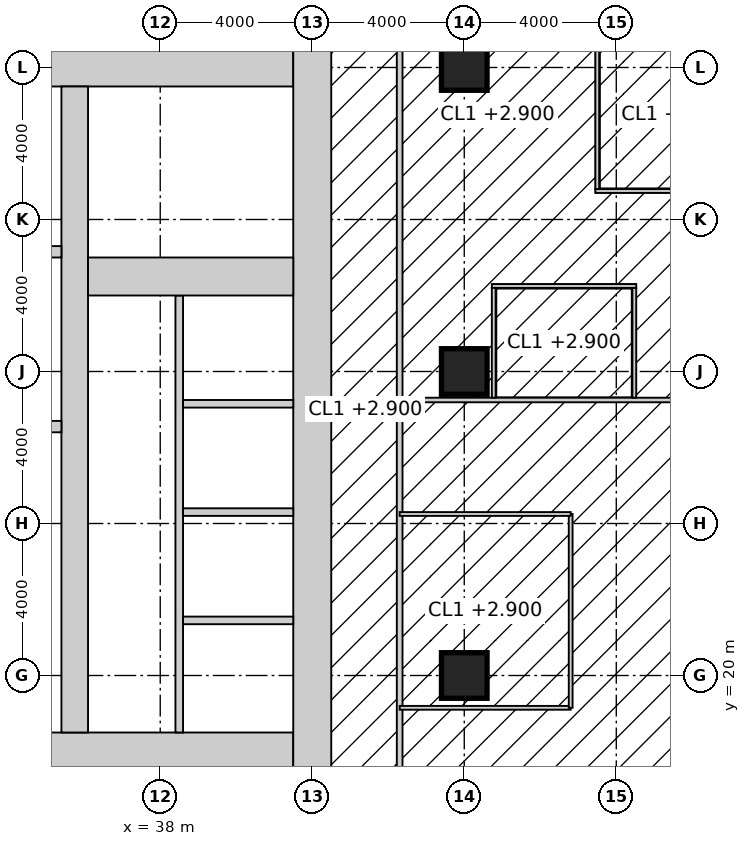
"""IFC4 building model, lengths in metres.
Left out: names, types, materials, properties, quantities, classifications, styles, units other than length and angle.
Written with IfcOpenShell. Run it as: python <this file> out.ifc"""

import sys

from ifc_helpers import new_model, si_unit, direction, frame, frame_2d, origin, origin_2d, place, context, subcontext, project, spatial, rectangle, hollow_rectangle, extrude, element, fill, save


model = new_model("IFC4")
c1 = context("Model", 3, precision=1e-05, world=origin(), true_north=direction((0.0, 1.0)))
c2 = subcontext(c1, "Body", "Model", "MODEL_VIEW")
j1 = project(units=[si_unit("LENGTHUNIT", "METRE"), si_unit("PLANEANGLEUNIT", "RADIAN")], contexts=[c1])
p1 = place(None, origin())
s1 = spatial("IfcSite", under=j1, at=p1, CompositionType="ELEMENT")
p2 = place(p1, origin())
s2 = spatial("IfcBuilding", under=s1, at=p2, CompositionType="ELEMENT")
p3 = place(p2, frame((0.0, 0.0, 19.0)))
s3 = spatial("IfcBuildingStorey", under=s2, at=p3, CompositionType="ELEMENT", Elevation=19.0)
for number, where, z_axis, x_axis in (
    (1, (46.0, 20.0, 0.0), (0.0, 0.0, 1.0), (1.0, 0.0, 0.0)),
    (2, (46.0, 28.0, 0.0), (0.0, 0.0, 1.0), (1.0, 0.0, 0.0)),
    (3, (46.0, 36.0, 0.0), (0.0, 0.0, 1.0), (1.0, 0.0, 0.0)),
):
    element("IfcColumn", number, at=place(p3, frame(where, z_axis=z_axis, x_axis=x_axis)), inside=s3, PredefinedType="COLUMN", context=c2, shape_type="SweptSolid", body=[
        extrude(hollow_rectangle(XDim=1.2, YDim=1.2, WallThickness=0.1, at=origin_2d()), origin(), (0.0, 0.0, 1.0), 4.0),
    ])
p4 = place(p3, frame((18.5, 17.8, -0.15), z_axis=(0.0, 0.0, 1.0), x_axis=(1.0, 0.0, 0.0)))
e4 = element("IfcWall", 4, at=p4, inside=s3, PredefinedType="SHEAR", context=c2, shape_type="SweptSolid", body=[
    extrude(rectangle(XDim=23.0, YDim=1.4, at=frame_2d((11.5, 0.0))), origin(), (0.0, 0.0, 1.0), 4.0),
])
p5 = place(p4, frame((3.45, 0.0, 0.15)))
e5 = element("IfcOpeningElement", 5, at=p5, cuts=e4, PredefinedType="OPENING", context=c2, shape_type="SweptSolid", body=[
    extrude(rectangle(XDim=1.5, YDim=2.4, at=frame_2d((0.75, 1.2))), frame((0.0, 0.71, 0.0), z_axis=(0.0, -1.0, 0.0), x_axis=(1.0, 0.0, 0.0)), (0.0, 0.0, 1.0), 1.42),
])
p6 = place(p4, frame((17.9, 0.0, 0.15)))
e6 = element("IfcOpeningElement", 6, at=p6, cuts=e4, PredefinedType="OPENING", context=c2, shape_type="SweptSolid", body=[
    extrude(rectangle(XDim=1.5, YDim=2.4, at=frame_2d((0.75, 1.2))), frame((0.0, 0.71, 0.0), z_axis=(0.0, -1.0, 0.0), x_axis=(1.0, 0.0, 0.0)), (0.0, 0.0, 1.0), 1.42),
])
p7 = place(p4, frame((0.9, 0.0, 0.15)))
e7 = element("IfcOpeningElement", 7, at=p7, cuts=e4, PredefinedType="OPENING", context=c2, shape_type="SweptSolid", body=[
    extrude(rectangle(XDim=1.0, YDim=2.2, at=frame_2d((0.5, 1.1))), frame((0.0, 0.71, 0.0), z_axis=(0.0, -1.0, 0.0), x_axis=(1.0, 0.0, 0.0)), (0.0, 0.0, 1.0), 1.42),
])
p8 = place(p3, frame((18.5, 36.2, -0.15), z_axis=(0.0, 0.0, 1.0), x_axis=(1.0, 0.0, 0.0)))
e8 = element("IfcWall", 8, at=p8, inside=s3, PredefinedType="SHEAR", context=c2, shape_type="SweptSolid", body=[
    extrude(rectangle(XDim=23.0, YDim=1.4, at=frame_2d((11.5, 0.0))), origin(), (0.0, 0.0, 1.0), 4.0),
])
p9 = place(p3, frame((42.0, 17.1, -0.15), z_axis=(0.0, 0.0, 1.0), x_axis=(0.0, 1.0, 0.0)))
e9 = element("IfcWall", 9, at=p9, inside=s3, PredefinedType="SHEAR", context=c2, shape_type="SweptSolid", body=[
    extrude(rectangle(XDim=19.8, YDim=1.0, at=frame_2d((9.9, 0.0))), origin(), (0.0, 0.0, 1.0), 4.0),
])
p10 = place(p3, frame((35.75, 18.5, -0.15), z_axis=(0.0, 0.0, 1.0), x_axis=(0.0, 1.0, 0.0)))
e10 = element("IfcWall", 10, at=p10, inside=s3, PredefinedType="SHEAR", context=c2, shape_type="SweptSolid", body=[
    extrude(rectangle(XDim=17.0, YDim=0.7, at=frame_2d((8.5, 0.0))), origin(), (0.0, 0.0, 1.0), 4.0),
])
p11 = place(p10, frame((9.85, 0.0, 0.15)))
e11 = element("IfcOpeningElement", 11, at=p11, cuts=e10, PredefinedType="OPENING", context=c2, shape_type="SweptSolid", body=[
    extrude(rectangle(XDim=1.0, YDim=2.2, at=frame_2d((0.5, 1.1))), frame((0.0, 0.36, 0.0), z_axis=(0.0, -1.0, 0.0), x_axis=(1.0, 0.0, 0.0)), (0.0, 0.0, 1.0), 0.72),
])
p12 = place(p3, frame((24.15, 26.55, -0.15), z_axis=(0.0, 0.0, 1.0), x_axis=(1.0, 0.0, 0.0)))
e12 = element("IfcWall", 12, at=p12, inside=s3, PredefinedType="SHEAR", context=c2, shape_type="SweptSolid", body=[
    extrude(rectangle(XDim=11.25, YDim=0.3, at=frame_2d((5.625, 0.0))), origin(), (0.0, 0.0, 1.0), 4.0),
])
p13 = place(p12, frame((9.25, 0.0, 0.15)))
e13 = element("IfcOpeningElement", 13, at=p13, cuts=e12, PredefinedType="OPENING", context=c2, shape_type="SweptSolid", body=[
    extrude(rectangle(XDim=1.0, YDim=2.2, at=frame_2d((0.5, 1.1))), frame((0.0, 0.16, 0.0), z_axis=(0.0, -1.0, 0.0), x_axis=(1.0, 0.0, 0.0)), (0.0, 0.0, 1.0), 0.32),
])
p14 = place(p12, frame((4.9, 0.0, 0.15)))
e14 = element("IfcOpeningElement", 14, at=p14, cuts=e12, PredefinedType="OPENING", context=c2, shape_type="SweptSolid", body=[
    extrude(rectangle(XDim=1.5, YDim=2.4, at=frame_2d((0.75, 1.2))), frame((0.0, 0.16, 0.0), z_axis=(0.0, -1.0, 0.0), x_axis=(1.0, 0.0, 0.0)), (0.0, 0.0, 1.0), 0.32),
])
p15 = place(p3, frame((24.15, 31.15, -0.15), z_axis=(0.0, 0.0, 1.0), x_axis=(1.0, 0.0, 0.0)))
e15 = element("IfcWall", 15, at=p15, inside=s3, PredefinedType="SHEAR", context=c2, shape_type="SweptSolid", body=[
    extrude(rectangle(XDim=11.25, YDim=0.3, at=frame_2d((5.625, 0.0))), origin(), (0.0, 0.0, 1.0), 4.0),
])
p16 = place(p15, frame((7.25, 0.0, 0.15)))
e16 = element("IfcOpeningElement", 16, at=p16, cuts=e15, PredefinedType="OPENING", context=c2, shape_type="SweptSolid", body=[
    extrude(rectangle(XDim=1.4, YDim=2.4, at=frame_2d((0.7, 1.2))), frame((0.0, 0.16, 0.0), z_axis=(0.0, -1.0, 0.0), x_axis=(1.0, 0.0, 0.0)), (0.0, 0.0, 1.0), 0.32),
])
p17 = place(p3, frame((38.5, 18.5, -0.15), z_axis=(0.0, 0.0, 1.0), x_axis=(0.0, 1.0, 0.0)))
e17 = element("IfcWall", 17, at=p17, inside=s3, PredefinedType="SOLIDWALL", context=c2, shape_type="SweptSolid", body=[
    extrude(rectangle(XDim=11.5, YDim=0.2, at=frame_2d((5.75, 0.0))), origin(), (0.0, 0.0, 1.0), 4.0),
])
p18 = place(p17, frame((0.875, 0.0, 0.15)))
e18 = element("IfcOpeningElement", 18, at=p18, cuts=e17, PredefinedType="OPENING", context=c2, shape_type="SweptSolid", body=[
    extrude(rectangle(XDim=1.1, YDim=2.2, at=frame_2d((0.55, 1.1))), frame((0.0, 0.11, 0.0), z_axis=(0.0, -1.0, 0.0), x_axis=(1.0, 0.0, 0.0)), (0.0, 0.0, 1.0), 0.22),
])
p19 = place(p17, frame((3.825, 0.0, 0.15)))
e19 = element("IfcOpeningElement", 19, at=p19, cuts=e17, PredefinedType="OPENING", context=c2, shape_type="SweptSolid", body=[
    extrude(rectangle(XDim=1.1, YDim=2.2, at=frame_2d((0.55, 1.1))), frame((0.0, 0.11, 0.0), z_axis=(0.0, -1.0, 0.0), x_axis=(1.0, 0.0, 0.0)), (0.0, 0.0, 1.0), 0.22),
])
p20 = place(p17, frame((6.675, 0.0, 0.15)))
e20 = element("IfcOpeningElement", 20, at=p20, cuts=e17, PredefinedType="OPENING", context=c2, shape_type="SweptSolid", body=[
    extrude(rectangle(XDim=1.1, YDim=2.2, at=frame_2d((0.55, 1.1))), frame((0.0, 0.11, 0.0), z_axis=(0.0, -1.0, 0.0), x_axis=(1.0, 0.0, 0.0)), (0.0, 0.0, 1.0), 0.22),
])
p21 = place(p17, frame((9.575, 0.0, 0.15)))
e21 = element("IfcOpeningElement", 21, at=p21, cuts=e17, PredefinedType="OPENING", context=c2, shape_type="SweptSolid", body=[
    extrude(rectangle(XDim=1.1, YDim=2.2, at=frame_2d((0.55, 1.1))), frame((0.0, 0.11, 0.0), z_axis=(0.0, -1.0, 0.0), x_axis=(1.0, 0.0, 0.0)), (0.0, 0.0, 1.0), 0.22),
])
p22 = place(p3, frame((36.1, 30.5, -0.15), z_axis=(0.0, 0.0, 1.0), x_axis=(1.0, 0.0, 0.0)))
e22 = element("IfcWall", 22, at=p22, inside=s3, PredefinedType="SHEAR", context=c2, shape_type="SweptSolid", body=[
    extrude(rectangle(XDim=5.4, YDim=1.0, at=frame_2d((2.7, 0.0))), origin(), (0.0, 0.0, 1.0), 4.0),
])
p23 = place(p22, frame((0.6, 0.0, 0.15)))
e23 = element("IfcOpeningElement", 23, at=p23, cuts=e22, PredefinedType="OPENING", context=c2, shape_type="SweptSolid", body=[
    extrude(rectangle(XDim=1.0, YDim=2.2, at=frame_2d((0.5, 1.1))), frame((0.0, 0.51, 0.0), z_axis=(0.0, -1.0, 0.0), x_axis=(1.0, 0.0, 0.0)), (0.0, 0.0, 1.0), 1.02),
])
for number, where, z_axis, x_axis in (
    (24, (38.6, 21.45, -0.15), (0.0, 0.0, 1.0), (1.0, 0.0, 0.0)),
    (25, (38.6, 24.3, -0.15), (0.0, 0.0, 1.0), (1.0, 0.0, 0.0)),
    (26, (38.6, 27.15, -0.15), (0.0, 0.0, 1.0), (1.0, 0.0, 0.0)),
):
    element("IfcWall", number, at=place(p3, frame(where, z_axis=z_axis, x_axis=x_axis)), inside=s3, PredefinedType="SOLIDWALL", context=c2, shape_type="SweptSolid", body=[
        extrude(rectangle(XDim=2.9, YDim=0.2, at=frame_2d((1.45, 0.0))), origin(), (0.0, 0.0, 1.0), 4.0),
    ])
p24 = place(p3, frame((44.3, 15.225, 0.0), z_axis=(0.0, 0.0, 1.0), x_axis=(0.0, 1.0, 0.0)))
e27 = element("IfcWall", 27, at=p24, inside=s3, PredefinedType="PARTITIONING", context=c2, shape_type="SweptSolid", body=[
    extrude(rectangle(XDim=23.55, YDim=0.15, at=frame_2d((11.775, 0.0))), origin(), (0.0, 0.0, 1.0), 3.85),
])
p25 = place(p24, frame((5.575, 0.0, 0.0)))
e28 = element("IfcOpeningElement", 28, at=p25, cuts=e27, PredefinedType="OPENING", context=c2, shape_type="SweptSolid", body=[
    extrude(rectangle(XDim=1.8, YDim=2.4, at=frame_2d((0.9, 1.2))), frame((0.0, 0.085, 0.0), z_axis=(0.0, -1.0, 0.0), x_axis=(1.0, 0.0, 0.0)), (0.0, 0.0, 1.0), 0.17),
])
p26 = place(p24, frame((16.825, 0.0, 0.0)))
e29 = element("IfcOpeningElement", 29, at=p26, cuts=e27, PredefinedType="OPENING", context=c2, shape_type="SweptSolid", body=[
    extrude(rectangle(XDim=1.8, YDim=2.4, at=frame_2d((0.9, 1.2))), frame((0.0, 0.085, 0.0), z_axis=(0.0, -1.0, 0.0), x_axis=(1.0, 0.0, 0.0)), (0.0, 0.0, 1.0), 0.17),
])
p27 = place(p3, frame((44.375, 27.25, 0.0), z_axis=(0.0, 0.0, 1.0), x_axis=(1.0, 0.0, 0.0)))
e30 = element("IfcWall", 30, at=p27, inside=s3, PredefinedType="PARTITIONING", context=c2, shape_type="SweptSolid", body=[
    extrude(rectangle(XDim=9.325, YDim=0.12, at=frame_2d((4.663, 0.0))), origin(), (0.0, 0.0, 1.0), 3.85),
])
p28 = place(p3, frame((46.725, 30.25, 0.0), z_axis=(0.0, 0.0, 1.0), x_axis=(1.0, 0.0, 0.0)))
e31 = element("IfcWall", 31, at=p28, inside=s3, PredefinedType="PARTITIONING", context=c2, shape_type="SweptSolid", body=[
    extrude(rectangle(XDim=3.8, YDim=0.1, at=frame_2d((1.9, 0.0))), origin(), (0.0, 0.0, 1.0), 3.85),
])
p29 = place(p28, frame((1.4, 0.0, 0.0)))
e32 = element("IfcOpeningElement", 32, at=p29, cuts=e31, PredefinedType="OPENING", context=c2, shape_type="SweptSolid", body=[
    extrude(rectangle(XDim=1.0, YDim=2.2, at=frame_2d((0.5, 1.1))), frame((0.0, 0.06, 0.0), z_axis=(0.0, -1.0, 0.0), x_axis=(1.0, 0.0, 0.0)), (0.0, 0.0, 1.0), 0.12),
])
p30 = place(p3, frame((49.45, 32.75, 0.0), z_axis=(0.0, 0.0, 1.0), x_axis=(1.0, 0.0, 0.0)))
e33 = element("IfcWall", 33, at=p30, inside=s3, PredefinedType="PARTITIONING", context=c2, shape_type="SweptSolid", body=[
    extrude(rectangle(XDim=4.25, YDim=0.1, at=frame_2d((2.125, 0.0))), origin(), (0.0, 0.0, 1.0), 3.85),
])
p31 = place(p3, frame((46.775, 27.31, 0.0), z_axis=(0.0, 0.0, 1.0), x_axis=(0.0, 1.0, 0.0)))
e34 = element("IfcWall", 34, at=p31, inside=s3, PredefinedType="PARTITIONING", context=c2, shape_type="SweptSolid", body=[
    extrude(rectangle(XDim=2.89, YDim=0.1, at=frame_2d((1.445, 0.0))), origin(), (0.0, 0.0, 1.0), 3.85),
])
p32 = place(p3, frame((49.5, 32.8, 0.0), z_axis=(0.0, 0.0, 1.0), x_axis=(0.0, 1.0, 0.0)))
e35 = element("IfcWall", 35, at=p32, inside=s3, PredefinedType="PARTITIONING", context=c2, shape_type="SweptSolid", body=[
    extrude(rectangle(XDim=3.9, YDim=0.1, at=frame_2d((1.95, 0.0))), origin(), (0.0, 0.0, 1.0), 3.85),
])
p33 = place(p32, frame((1.45, 0.0, 0.0)))
e36 = element("IfcOpeningElement", 36, at=p33, cuts=e35, PredefinedType="OPENING", context=c2, shape_type="SweptSolid", body=[
    extrude(rectangle(XDim=1.0, YDim=2.2, at=frame_2d((0.5, 1.1))), frame((0.0, 0.06, 0.0), z_axis=(0.0, -1.0, 0.0), x_axis=(1.0, 0.0, 0.0)), (0.0, 0.0, 1.0), 0.12),
])
p34 = place(p3, frame((50.475, 27.31, 0.0), z_axis=(0.0, 0.0, 1.0), x_axis=(0.0, 1.0, 0.0)))
e37 = element("IfcWall", 37, at=p34, inside=s3, PredefinedType="PARTITIONING", context=c2, shape_type="SweptSolid", body=[
    extrude(rectangle(XDim=2.89, YDim=0.1, at=frame_2d((1.445, 0.0))), origin(), (0.0, 0.0, 1.0), 3.85),
])
p35 = place(p3, frame((44.3, 19.15, 0.0), z_axis=(0.0, 0.0, 1.0), x_axis=(1.0, 0.0, 0.0)))
e38 = element("IfcWall", 38, at=p35, inside=s3, PredefinedType="PARTITIONING", context=c2, shape_type="SweptSolid", body=[
    extrude(rectangle(XDim=4.5, YDim=0.1, at=frame_2d((2.25, 0.0))), origin(), (0.0, 0.0, 1.0), 3.85),
])
p36 = place(p3, frame((48.8, 19.15, 0.0), z_axis=(0.0, 0.0, 1.0), x_axis=(0.0, 1.0, 0.0)))
e39 = element("IfcWall", 39, at=p36, inside=s3, PredefinedType="PARTITIONING", context=c2, shape_type="SweptSolid", body=[
    extrude(rectangle(XDim=5.1, YDim=0.1, at=frame_2d((2.55, 0.0))), origin(), (0.0, 0.0, 1.0), 3.85),
])
p37 = place(p36, frame((2.05, 0.0, 0.0)))
e40 = element("IfcOpeningElement", 40, at=p37, cuts=e39, PredefinedType="OPENING", context=c2, shape_type="SweptSolid", body=[
    extrude(rectangle(XDim=1.0, YDim=2.2, at=frame_2d((0.5, 1.1))), frame((0.0, 0.06, 0.0), z_axis=(0.0, -1.0, 0.0), x_axis=(1.0, 0.0, 0.0)), (0.0, 0.0, 1.0), 0.12),
])
p38 = place(p3, frame((48.8, 24.25, 0.0), z_axis=(0.0, 0.0, 1.0), x_axis=(-1.0, 0.0, 0.0)))
e41 = element("IfcWall", 41, at=p38, inside=s3, PredefinedType="PARTITIONING", context=c2, shape_type="SweptSolid", body=[
    extrude(rectangle(XDim=4.5, YDim=0.1, at=frame_2d((2.25, 0.0))), origin(), (0.0, 0.0, 1.0), 3.85),
])
p39 = place(p11, origin())
e42 = element("IfcDoor", 42, at=p39, inside=s3, OperationType="SINGLE_SWING_RIGHT", PredefinedType="DOOR", context=c2, shape_type="SweptSolid", body=[
    extrude(rectangle(XDim=1.0, YDim=2.2, at=frame_2d((0.5, 1.1))), frame((0.0, 0.025, 0.0), z_axis=(0.0, -1.0, 0.0), x_axis=(1.0, 0.0, 0.0)), (0.0, 0.0, 1.0), 0.05),
])
fill(e11, e42)
p40 = place(p6, origin())
e43 = element("IfcDoor", 43, at=p40, inside=s3, OperationType="DOUBLE_DOOR_DOUBLE_SWING", PredefinedType="DOOR", context=c2, shape_type="SweptSolid", body=[
    extrude(rectangle(XDim=1.5, YDim=2.4, at=frame_2d((0.75, 1.2))), frame((0.0, 0.025, 0.0), z_axis=(0.0, -1.0, 0.0), x_axis=(1.0, 0.0, 0.0)), (0.0, 0.0, 1.0), 0.05),
])
fill(e6, e43)
p41 = place(p23, origin())
e44 = element("IfcDoor", 44, at=p41, inside=s3, OperationType="SINGLE_SWING_LEFT", PredefinedType="DOOR", context=c2, shape_type="SweptSolid", body=[
    extrude(rectangle(XDim=1.0, YDim=2.2, at=frame_2d((0.5, 1.1))), frame((0.0, 0.025, 0.0), z_axis=(0.0, -1.0, 0.0), x_axis=(1.0, 0.0, 0.0)), (0.0, 0.0, 1.0), 0.05),
])
fill(e23, e44)
p42 = place(p25, origin())
e45 = element("IfcDoor", 45, at=p42, inside=s3, OperationType="DOUBLE_DOOR_DOUBLE_SWING", PredefinedType="DOOR", context=c2, shape_type="SweptSolid", body=[
    extrude(rectangle(XDim=1.8, YDim=2.4, at=frame_2d((0.9, 1.2))), frame((0.0, 0.025, 0.0), z_axis=(0.0, -1.0, 0.0), x_axis=(1.0, 0.0, 0.0)), (0.0, 0.0, 1.0), 0.05),
])
fill(e28, e45)
p43 = place(p26, origin())
e46 = element("IfcDoor", 46, at=p43, inside=s3, OperationType="DOUBLE_DOOR_DOUBLE_SWING", PredefinedType="DOOR", context=c2, shape_type="SweptSolid", body=[
    extrude(rectangle(XDim=1.8, YDim=2.4, at=frame_2d((0.9, 1.2))), frame((0.0, 0.025, 0.0), z_axis=(0.0, -1.0, 0.0), x_axis=(1.0, 0.0, 0.0)), (0.0, 0.0, 1.0), 0.05),
])
fill(e29, e46)
p44 = place(p33, origin())
e47 = element("IfcDoor", 47, at=p44, inside=s3, OperationType="SINGLE_SWING_LEFT", PredefinedType="DOOR", context=c2, shape_type="SweptSolid", body=[
    extrude(rectangle(XDim=1.0, YDim=2.2, at=frame_2d((0.5, 1.1))), frame((0.0, 0.025, 0.0), z_axis=(0.0, -1.0, 0.0), x_axis=(1.0, 0.0, 0.0)), (0.0, 0.0, 1.0), 0.05),
])
fill(e36, e47)
p45 = place(p29, origin())
e48 = element("IfcDoor", 48, at=p45, inside=s3, OperationType="SINGLE_SWING_RIGHT", PredefinedType="DOOR", context=c2, shape_type="SweptSolid", body=[
    extrude(rectangle(XDim=1.0, YDim=2.2, at=frame_2d((0.5, 1.1))), frame((0.0, 0.025, 0.0), z_axis=(0.0, -1.0, 0.0), x_axis=(1.0, 0.0, 0.0)), (0.0, 0.0, 1.0), 0.05),
])
fill(e32, e48)
p46 = place(p37, origin())
e49 = element("IfcDoor", 49, at=p46, inside=s3, OperationType="SINGLE_SWING_RIGHT", PredefinedType="DOOR", context=c2, shape_type="SweptSolid", body=[
    extrude(rectangle(XDim=1.0, YDim=2.2, at=frame_2d((0.5, 1.1))), frame((0.0, 0.025, 0.0), z_axis=(0.0, -1.0, 0.0), x_axis=(1.0, 0.0, 0.0)), (0.0, 0.0, 1.0), 0.05),
])
fill(e40, e49)
p47 = place(p18, origin())
e50 = element("IfcDoor", 50, at=p47, inside=s3, OperationType="DOUBLE_DOOR_SLIDING", PredefinedType="DOOR", context=c2, shape_type="SweptSolid", body=[
    extrude(rectangle(XDim=1.1, YDim=2.2, at=frame_2d((0.55, 1.1))), frame((0.0, 0.025, 0.0), z_axis=(0.0, -1.0, 0.0), x_axis=(1.0, 0.0, 0.0)), (0.0, 0.0, 1.0), 0.05),
])
fill(e18, e50)
p48 = place(p19, origin())
e51 = element("IfcDoor", 51, at=p48, inside=s3, OperationType="DOUBLE_DOOR_SLIDING", PredefinedType="DOOR", context=c2, shape_type="SweptSolid", body=[
    extrude(rectangle(XDim=1.1, YDim=2.2, at=frame_2d((0.55, 1.1))), frame((0.0, 0.025, 0.0), z_axis=(0.0, -1.0, 0.0), x_axis=(1.0, 0.0, 0.0)), (0.0, 0.0, 1.0), 0.05),
])
fill(e19, e51)
p49 = place(p20, origin())
e52 = element("IfcDoor", 52, at=p49, inside=s3, OperationType="DOUBLE_DOOR_SLIDING", PredefinedType="DOOR", context=c2, shape_type="SweptSolid", body=[
    extrude(rectangle(XDim=1.1, YDim=2.2, at=frame_2d((0.55, 1.1))), frame((0.0, 0.025, 0.0), z_axis=(0.0, -1.0, 0.0), x_axis=(1.0, 0.0, 0.0)), (0.0, 0.0, 1.0), 0.05),
])
fill(e20, e52)
p50 = place(p21, origin())
e53 = element("IfcDoor", 53, at=p50, inside=s3, OperationType="DOUBLE_DOOR_SLIDING", PredefinedType="DOOR", context=c2, shape_type="SweptSolid", body=[
    extrude(rectangle(XDim=1.1, YDim=2.2, at=frame_2d((0.55, 1.1))), frame((0.0, 0.025, 0.0), z_axis=(0.0, -1.0, 0.0), x_axis=(1.0, 0.0, 0.0)), (0.0, 0.0, 1.0), 0.05),
])
fill(e21, e53)
save(model, sys.argv[1])
